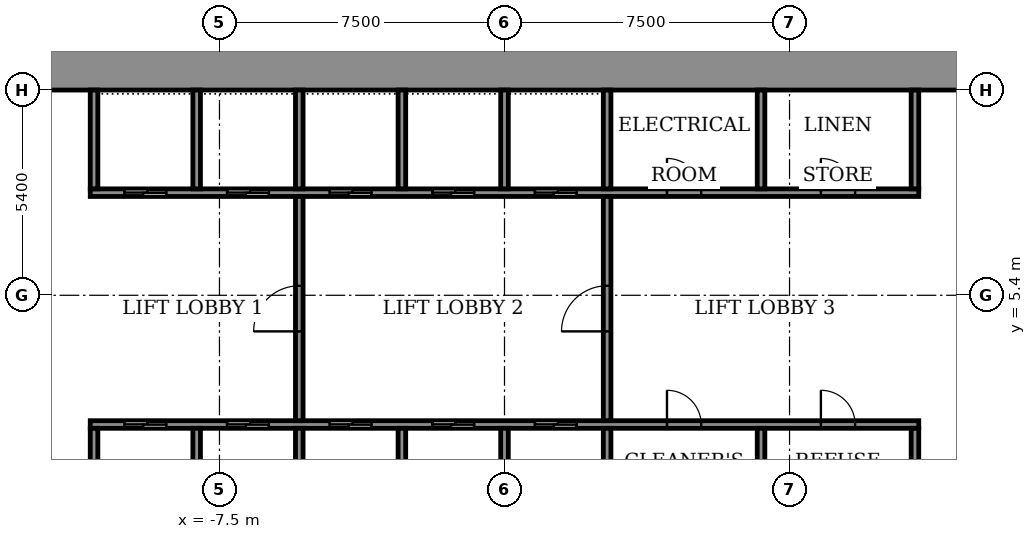
"""IFC4 building model, lengths in metres.
Left out: names, types, materials, properties, quantities, classifications, styles, units other than length and angle.
Written with IfcOpenShell. Run it as: python <this file> out.ifc"""

import sys

from ifc_helpers import new_model, si_unit, direction, frame, frame_2d, origin, place, context, subcontext, project, spatial, rectangle, extrude, element, fill, save


model = new_model("IFC4")
c1 = context("Model", 3, precision=1e-05, world=origin(), true_north=direction((0.0, 1.0)))
c2 = subcontext(c1, "Body", "Model", "MODEL_VIEW")
j1 = project(units=[si_unit("LENGTHUNIT", "METRE"), si_unit("PLANEANGLEUNIT", "RADIAN")], contexts=[c1])
p1 = place(None, origin())
s1 = spatial("IfcSite", under=j1, at=p1, CompositionType="ELEMENT")
p2 = place(p1, origin())
s2 = spatial("IfcBuilding", under=s1, at=p2, CompositionType="ELEMENT")
p3 = place(p2, frame((0.0, 0.0, 11.0)))
s3 = spatial("IfcBuildingStorey", under=s2, at=p3, CompositionType="ELEMENT", Elevation=11.0)
p4 = place(p3, frame((-15.0, 11.4, 0.0), z_axis=(0.0, 0.0, 1.0), x_axis=(1.0, 0.0, 0.0)))
e1 = element("IfcWall", 1, at=p4, inside=s3, PredefinedType="SHEAR", context=c2, shape_type="SweptSolid", body=[
    extrude(rectangle(XDim=30.0, YDim=1.2, at=frame_2d((15.0, 0.0))), origin(), (0.0, 0.0, 1.0), 5.0),
])
p5 = place(p3, frame((-10.9, 2.0, 0.0), z_axis=(0.0, 0.0, 1.0), x_axis=(1.0, 0.0, 0.0)))
e2 = element("IfcWall", 2, at=p5, inside=s3, PredefinedType="SHEAR", context=c2, shape_type="SweptSolid", body=[
    extrude(rectangle(XDim=21.8, YDim=0.2, at=frame_2d((10.9, 0.0))), origin(), (0.0, 0.0, 1.0), 4.45),
])
p6 = place(p5, frame((0.9, 0.0, 0.0)))
e3 = element("IfcOpeningElement", 3, at=p6, cuts=e2, PredefinedType="OPENING", context=c2, shape_type="SweptSolid", body=[
    extrude(rectangle(XDim=1.1, YDim=2.1, at=frame_2d((0.55, 1.05))), frame((0.0, 0.11, 0.0), z_axis=(0.0, -1.0, 0.0), x_axis=(1.0, 0.0, 0.0)), (0.0, 0.0, 1.0), 0.22),
])
p7 = place(p5, frame((3.6, 0.0, 0.0)))
e4 = element("IfcOpeningElement", 4, at=p7, cuts=e2, PredefinedType="OPENING", context=c2, shape_type="SweptSolid", body=[
    extrude(rectangle(XDim=1.1, YDim=2.1, at=frame_2d((0.55, 1.05))), frame((0.0, 0.11, 0.0), z_axis=(0.0, -1.0, 0.0), x_axis=(1.0, 0.0, 0.0)), (0.0, 0.0, 1.0), 0.22),
])
p8 = place(p5, frame((6.3, 0.0, 0.0)))
e5 = element("IfcOpeningElement", 5, at=p8, cuts=e2, PredefinedType="OPENING", context=c2, shape_type="SweptSolid", body=[
    extrude(rectangle(XDim=1.1, YDim=2.1, at=frame_2d((0.55, 1.05))), frame((0.0, 0.11, 0.0), z_axis=(0.0, -1.0, 0.0), x_axis=(1.0, 0.0, 0.0)), (0.0, 0.0, 1.0), 0.22),
])
p9 = place(p5, frame((9.0, 0.0, 0.0)))
e6 = element("IfcOpeningElement", 6, at=p9, cuts=e2, PredefinedType="OPENING", context=c2, shape_type="SweptSolid", body=[
    extrude(rectangle(XDim=1.1, YDim=2.1, at=frame_2d((0.55, 1.05))), frame((0.0, 0.11, 0.0), z_axis=(0.0, -1.0, 0.0), x_axis=(1.0, 0.0, 0.0)), (0.0, 0.0, 1.0), 0.22),
])
p10 = place(p5, frame((11.7, 0.0, 0.0)))
e7 = element("IfcOpeningElement", 7, at=p10, cuts=e2, PredefinedType="OPENING", context=c2, shape_type="SweptSolid", body=[
    extrude(rectangle(XDim=1.1, YDim=2.1, at=frame_2d((0.55, 1.05))), frame((0.0, 0.11, 0.0), z_axis=(0.0, -1.0, 0.0), x_axis=(1.0, 0.0, 0.0)), (0.0, 0.0, 1.0), 0.22),
])
p11 = place(p5, frame((15.175, 0.0, 0.0)))
e8 = element("IfcOpeningElement", 8, at=p11, cuts=e2, PredefinedType="OPENING", context=c2, shape_type="SweptSolid", body=[
    extrude(rectangle(XDim=0.9, YDim=2.1, at=frame_2d((0.45, 1.05))), frame((0.0, 0.11, 0.0), z_axis=(0.0, -1.0, 0.0), x_axis=(1.0, 0.0, 0.0)), (0.0, 0.0, 1.0), 0.22),
])
p12 = place(p5, frame((19.225, 0.0, 0.0)))
e9 = element("IfcOpeningElement", 9, at=p12, cuts=e2, PredefinedType="OPENING", context=c2, shape_type="SweptSolid", body=[
    extrude(rectangle(XDim=0.9, YDim=2.1, at=frame_2d((0.45, 1.05))), frame((0.0, 0.11, 0.0), z_axis=(0.0, -1.0, 0.0), x_axis=(1.0, 0.0, 0.0)), (0.0, 0.0, 1.0), 0.22),
])
p13 = place(p3, frame((-10.9, 8.1, 0.0), z_axis=(0.0, 0.0, 1.0), x_axis=(1.0, 0.0, 0.0)))
e10 = element("IfcWall", 10, at=p13, inside=s3, PredefinedType="SHEAR", context=c2, shape_type="SweptSolid", body=[
    extrude(rectangle(XDim=21.8, YDim=0.2, at=frame_2d((10.9, 0.0))), origin(), (0.0, 0.0, 1.0), 4.45),
])
p14 = place(p13, frame((0.9, 0.0, 0.0)))
e11 = element("IfcOpeningElement", 11, at=p14, cuts=e10, PredefinedType="OPENING", context=c2, shape_type="SweptSolid", body=[
    extrude(rectangle(XDim=1.1, YDim=2.1, at=frame_2d((0.55, 1.05))), frame((0.0, 0.11, 0.0), z_axis=(0.0, -1.0, 0.0), x_axis=(1.0, 0.0, 0.0)), (0.0, 0.0, 1.0), 0.22),
])
p15 = place(p13, frame((3.6, 0.0, 0.0)))
e12 = element("IfcOpeningElement", 12, at=p15, cuts=e10, PredefinedType="OPENING", context=c2, shape_type="SweptSolid", body=[
    extrude(rectangle(XDim=1.1, YDim=2.1, at=frame_2d((0.55, 1.05))), frame((0.0, 0.11, 0.0), z_axis=(0.0, -1.0, 0.0), x_axis=(1.0, 0.0, 0.0)), (0.0, 0.0, 1.0), 0.22),
])
p16 = place(p13, frame((6.3, 0.0, 0.0)))
e13 = element("IfcOpeningElement", 13, at=p16, cuts=e10, PredefinedType="OPENING", context=c2, shape_type="SweptSolid", body=[
    extrude(rectangle(XDim=1.1, YDim=2.1, at=frame_2d((0.55, 1.05))), frame((0.0, 0.11, 0.0), z_axis=(0.0, -1.0, 0.0), x_axis=(1.0, 0.0, 0.0)), (0.0, 0.0, 1.0), 0.22),
])
p17 = place(p13, frame((9.0, 0.0, 0.0)))
e14 = element("IfcOpeningElement", 14, at=p17, cuts=e10, PredefinedType="OPENING", context=c2, shape_type="SweptSolid", body=[
    extrude(rectangle(XDim=1.1, YDim=2.1, at=frame_2d((0.55, 1.05))), frame((0.0, 0.11, 0.0), z_axis=(0.0, -1.0, 0.0), x_axis=(1.0, 0.0, 0.0)), (0.0, 0.0, 1.0), 0.22),
])
p18 = place(p13, frame((11.7, 0.0, 0.0)))
e15 = element("IfcOpeningElement", 15, at=p18, cuts=e10, PredefinedType="OPENING", context=c2, shape_type="SweptSolid", body=[
    extrude(rectangle(XDim=1.1, YDim=2.1, at=frame_2d((0.55, 1.05))), frame((0.0, 0.11, 0.0), z_axis=(0.0, -1.0, 0.0), x_axis=(1.0, 0.0, 0.0)), (0.0, 0.0, 1.0), 0.22),
])
p19 = place(p13, frame((15.175, 0.0, 0.0)))
e16 = element("IfcOpeningElement", 16, at=p19, cuts=e10, PredefinedType="OPENING", context=c2, shape_type="SweptSolid", body=[
    extrude(rectangle(XDim=0.9, YDim=2.1, at=frame_2d((0.45, 1.05))), frame((0.0, 0.11, 0.0), z_axis=(0.0, -1.0, 0.0), x_axis=(1.0, 0.0, 0.0)), (0.0, 0.0, 1.0), 0.22),
])
p20 = place(p13, frame((19.225, 0.0, 0.0)))
e17 = element("IfcOpeningElement", 17, at=p20, cuts=e10, PredefinedType="OPENING", context=c2, shape_type="SweptSolid", body=[
    extrude(rectangle(XDim=0.9, YDim=2.1, at=frame_2d((0.45, 1.05))), frame((0.0, 0.11, 0.0), z_axis=(0.0, -1.0, 0.0), x_axis=(1.0, 0.0, 0.0)), (0.0, 0.0, 1.0), 0.22),
])
for number, where, z_axis, x_axis in (
    (18, (-10.8, -0.6, 0.0), (0.0, 0.0, 1.0), (0.0, 1.0, 0.0)),
    (19, (-8.1, -0.6, 0.0), (0.0, 0.0, 1.0), (0.0, 1.0, 0.0)),
    (20, (-5.4, -0.6, 0.0), (0.0, 0.0, 1.0), (0.0, 1.0, 0.0)),
    (21, (-2.7, -0.6, 0.0), (0.0, 0.0, 1.0), (0.0, 1.0, 0.0)),
    (22, (0.0, -0.6, 0.0), (0.0, 0.0, 1.0), (0.0, 1.0, 0.0)),
    (23, (2.7, -0.6, 0.0), (0.0, 0.0, 1.0), (0.0, 1.0, 0.0)),
):
    element("IfcWall", number, at=place(p3, frame(where, z_axis=z_axis, x_axis=x_axis)), inside=s3, PredefinedType="SHEAR", context=c2, shape_type="SweptSolid", body=[
        extrude(rectangle(XDim=2.5, YDim=0.2, at=frame_2d((1.25, 0.0))), origin(), (0.0, 0.0, 1.0), 4.45),
    ])
for number, where, z_axis, x_axis in (
    (24, (6.75, -0.6, 0.0), (0.0, 0.0, 1.0), (0.0, 1.0, 0.0)),
    (25, (10.8, -0.6, 0.0), (0.0, 0.0, 1.0), (0.0, 1.0, 0.0)),
):
    element("IfcWall", number, at=place(p3, frame(where, z_axis=z_axis, x_axis=x_axis)), inside=s3, PredefinedType="STANDARD", context=c2, shape_type="SweptSolid", body=[
        extrude(rectangle(XDim=2.5, YDim=0.2, at=frame_2d((1.25, 0.0))), origin(), (0.0, 0.0, 1.0), 4.45),
    ])
for number, where, z_axis, x_axis in (
    (26, (-10.8, 8.2, 0.0), (0.0, 0.0, 1.0), (0.0, 1.0, 0.0)),
    (27, (-8.1, 8.2, 0.0), (0.0, 0.0, 1.0), (0.0, 1.0, 0.0)),
    (28, (-5.4, 8.2, 0.0), (0.0, 0.0, 1.0), (0.0, 1.0, 0.0)),
    (29, (-2.7, 8.2, 0.0), (0.0, 0.0, 1.0), (0.0, 1.0, 0.0)),
    (30, (0.0, 8.2, 0.0), (0.0, 0.0, 1.0), (0.0, 1.0, 0.0)),
    (31, (2.7, 8.2, 0.0), (0.0, 0.0, 1.0), (0.0, 1.0, 0.0)),
):
    element("IfcWall", number, at=place(p3, frame(where, z_axis=z_axis, x_axis=x_axis)), inside=s3, PredefinedType="SHEAR", context=c2, shape_type="SweptSolid", body=[
        extrude(rectangle(XDim=2.6, YDim=0.2, at=frame_2d((1.3, 0.0))), origin(), (0.0, 0.0, 1.0), 4.45),
    ])
for number, where, z_axis, x_axis in (
    (32, (6.75, 8.2, 0.0), (0.0, 0.0, 1.0), (0.0, 1.0, 0.0)),
    (33, (10.8, 8.2, 0.0), (0.0, 0.0, 1.0), (0.0, 1.0, 0.0)),
):
    element("IfcWall", number, at=place(p3, frame(where, z_axis=z_axis, x_axis=x_axis)), inside=s3, PredefinedType="STANDARD", context=c2, shape_type="SweptSolid", body=[
        extrude(rectangle(XDim=2.6, YDim=0.2, at=frame_2d((1.3, 0.0))), origin(), (0.0, 0.0, 1.0), 4.45),
    ])
p21 = place(p3, frame((-5.4, 2.1, 0.0), z_axis=(0.0, 0.0, 1.0), x_axis=(0.0, 1.0, 0.0)))
e34 = element("IfcWall", 34, at=p21, inside=s3, PredefinedType="STANDARD", context=c2, shape_type="SweptSolid", body=[
    extrude(rectangle(XDim=5.9, YDim=0.2, at=frame_2d((2.95, 0.0))), origin(), (0.0, 0.0, 1.0), 4.45),
])
p22 = place(p21, frame((2.35, 0.0, 0.0)))
e35 = element("IfcOpeningElement", 35, at=p22, cuts=e34, PredefinedType="OPENING", context=c2, shape_type="SweptSolid", body=[
    extrude(rectangle(XDim=1.2, YDim=2.1, at=frame_2d((0.6, 1.05))), frame((0.0, 0.11, 0.0), z_axis=(0.0, -1.0, 0.0), x_axis=(1.0, 0.0, 0.0)), (0.0, 0.0, 1.0), 0.22),
])
p23 = place(p3, frame((2.7, 2.1, 0.0), z_axis=(0.0, 0.0, 1.0), x_axis=(0.0, 1.0, 0.0)))
e36 = element("IfcWall", 36, at=p23, inside=s3, PredefinedType="STANDARD", context=c2, shape_type="SweptSolid", body=[
    extrude(rectangle(XDim=5.9, YDim=0.2, at=frame_2d((2.95, 0.0))), origin(), (0.0, 0.0, 1.0), 4.45),
])
p24 = place(p23, frame((2.35, 0.0, 0.0)))
e37 = element("IfcOpeningElement", 37, at=p24, cuts=e36, PredefinedType="OPENING", context=c2, shape_type="SweptSolid", body=[
    extrude(rectangle(XDim=1.2, YDim=2.1, at=frame_2d((0.6, 1.05))), frame((0.0, 0.11, 0.0), z_axis=(0.0, -1.0, 0.0), x_axis=(1.0, 0.0, 0.0)), (0.0, 0.0, 1.0), 0.22),
])
p25 = place(p6, origin())
e38 = element("IfcDoor", 38, at=p25, inside=s3, OperationType="SLIDING_TO_LEFT", PredefinedType="DOOR", context=c2, shape_type="SweptSolid", body=[
    extrude(rectangle(XDim=1.1, YDim=2.1, at=frame_2d((0.55, 1.05))), frame((0.0, 0.025, 0.0), z_axis=(0.0, -1.0, 0.0), x_axis=(1.0, 0.0, 0.0)), (0.0, 0.0, 1.0), 0.05),
])
fill(e3, e38)
p26 = place(p7, origin())
e39 = element("IfcDoor", 39, at=p26, inside=s3, OperationType="SLIDING_TO_LEFT", PredefinedType="DOOR", context=c2, shape_type="SweptSolid", body=[
    extrude(rectangle(XDim=1.1, YDim=2.1, at=frame_2d((0.55, 1.05))), frame((0.0, 0.025, 0.0), z_axis=(0.0, -1.0, 0.0), x_axis=(1.0, 0.0, 0.0)), (0.0, 0.0, 1.0), 0.05),
])
fill(e4, e39)
p27 = place(p8, origin())
e40 = element("IfcDoor", 40, at=p27, inside=s3, OperationType="SLIDING_TO_LEFT", PredefinedType="DOOR", context=c2, shape_type="SweptSolid", body=[
    extrude(rectangle(XDim=1.1, YDim=2.1, at=frame_2d((0.55, 1.05))), frame((0.0, 0.025, 0.0), z_axis=(0.0, -1.0, 0.0), x_axis=(1.0, 0.0, 0.0)), (0.0, 0.0, 1.0), 0.05),
])
fill(e5, e40)
p28 = place(p9, origin())
e41 = element("IfcDoor", 41, at=p28, inside=s3, OperationType="SLIDING_TO_LEFT", PredefinedType="DOOR", context=c2, shape_type="SweptSolid", body=[
    extrude(rectangle(XDim=1.1, YDim=2.1, at=frame_2d((0.55, 1.05))), frame((0.0, 0.025, 0.0), z_axis=(0.0, -1.0, 0.0), x_axis=(1.0, 0.0, 0.0)), (0.0, 0.0, 1.0), 0.05),
])
fill(e6, e41)
p29 = place(p10, origin())
e42 = element("IfcDoor", 42, at=p29, inside=s3, OperationType="SLIDING_TO_LEFT", PredefinedType="DOOR", context=c2, shape_type="SweptSolid", body=[
    extrude(rectangle(XDim=1.1, YDim=2.1, at=frame_2d((0.55, 1.05))), frame((0.0, 0.025, 0.0), z_axis=(0.0, -1.0, 0.0), x_axis=(1.0, 0.0, 0.0)), (0.0, 0.0, 1.0), 0.05),
])
fill(e7, e42)
p30 = place(p14, origin())
e43 = element("IfcDoor", 43, at=p30, inside=s3, OperationType="SLIDING_TO_LEFT", PredefinedType="DOOR", context=c2, shape_type="SweptSolid", body=[
    extrude(rectangle(XDim=1.1, YDim=2.1, at=frame_2d((0.55, 1.05))), frame((0.0, 0.025, 0.0), z_axis=(0.0, -1.0, 0.0), x_axis=(1.0, 0.0, 0.0)), (0.0, 0.0, 1.0), 0.05),
])
fill(e11, e43)
p31 = place(p15, origin())
e44 = element("IfcDoor", 44, at=p31, inside=s3, OperationType="SLIDING_TO_LEFT", PredefinedType="DOOR", context=c2, shape_type="SweptSolid", body=[
    extrude(rectangle(XDim=1.1, YDim=2.1, at=frame_2d((0.55, 1.05))), frame((0.0, 0.025, 0.0), z_axis=(0.0, -1.0, 0.0), x_axis=(1.0, 0.0, 0.0)), (0.0, 0.0, 1.0), 0.05),
])
fill(e12, e44)
p32 = place(p16, origin())
e45 = element("IfcDoor", 45, at=p32, inside=s3, OperationType="SLIDING_TO_LEFT", PredefinedType="DOOR", context=c2, shape_type="SweptSolid", body=[
    extrude(rectangle(XDim=1.1, YDim=2.1, at=frame_2d((0.55, 1.05))), frame((0.0, 0.025, 0.0), z_axis=(0.0, -1.0, 0.0), x_axis=(1.0, 0.0, 0.0)), (0.0, 0.0, 1.0), 0.05),
])
fill(e13, e45)
p33 = place(p17, origin())
e46 = element("IfcDoor", 46, at=p33, inside=s3, OperationType="SLIDING_TO_LEFT", PredefinedType="DOOR", context=c2, shape_type="SweptSolid", body=[
    extrude(rectangle(XDim=1.1, YDim=2.1, at=frame_2d((0.55, 1.05))), frame((0.0, 0.025, 0.0), z_axis=(0.0, -1.0, 0.0), x_axis=(1.0, 0.0, 0.0)), (0.0, 0.0, 1.0), 0.05),
])
fill(e14, e46)
p34 = place(p18, origin())
e47 = element("IfcDoor", 47, at=p34, inside=s3, OperationType="SLIDING_TO_LEFT", PredefinedType="DOOR", context=c2, shape_type="SweptSolid", body=[
    extrude(rectangle(XDim=1.1, YDim=2.1, at=frame_2d((0.55, 1.05))), frame((0.0, 0.025, 0.0), z_axis=(0.0, -1.0, 0.0), x_axis=(1.0, 0.0, 0.0)), (0.0, 0.0, 1.0), 0.05),
])
fill(e15, e47)
p35 = place(p11, origin())
e48 = element("IfcDoor", 48, at=p35, inside=s3, OperationType="SINGLE_SWING_RIGHT", PredefinedType="DOOR", context=c2, shape_type="SweptSolid", body=[
    extrude(rectangle(XDim=0.9, YDim=2.1, at=frame_2d((0.45, 1.05))), frame((0.0, 0.025, 0.0), z_axis=(0.0, -1.0, 0.0), x_axis=(1.0, 0.0, 0.0)), (0.0, 0.0, 1.0), 0.05),
])
fill(e8, e48)
p36 = place(p12, origin())
e49 = element("IfcDoor", 49, at=p36, inside=s3, OperationType="SINGLE_SWING_RIGHT", PredefinedType="DOOR", context=c2, shape_type="SweptSolid", body=[
    extrude(rectangle(XDim=0.9, YDim=2.1, at=frame_2d((0.45, 1.05))), frame((0.0, 0.025, 0.0), z_axis=(0.0, -1.0, 0.0), x_axis=(1.0, 0.0, 0.0)), (0.0, 0.0, 1.0), 0.05),
])
fill(e9, e49)
p37 = place(p19, origin())
e50 = element("IfcDoor", 50, at=p37, inside=s3, OperationType="SINGLE_SWING_LEFT", PredefinedType="DOOR", context=c2, shape_type="SweptSolid", body=[
    extrude(rectangle(XDim=0.9, YDim=2.1, at=frame_2d((0.45, 1.05))), frame((0.0, 0.025, 0.0), z_axis=(0.0, -1.0, 0.0), x_axis=(1.0, 0.0, 0.0)), (0.0, 0.0, 1.0), 0.05),
])
fill(e16, e50)
p38 = place(p20, origin())
e51 = element("IfcDoor", 51, at=p38, inside=s3, OperationType="SINGLE_SWING_RIGHT", PredefinedType="DOOR", context=c2, shape_type="SweptSolid", body=[
    extrude(rectangle(XDim=0.9, YDim=2.1, at=frame_2d((0.45, 1.05))), frame((0.0, 0.025, 0.0), z_axis=(0.0, -1.0, 0.0), x_axis=(1.0, 0.0, 0.0)), (0.0, 0.0, 1.0), 0.05),
])
fill(e17, e51)
p39 = place(p22, origin())
e52 = element("IfcDoor", 52, at=p39, inside=s3, OperationType="SINGLE_SWING_LEFT", PredefinedType="DOOR", context=c2, shape_type="SweptSolid", body=[
    extrude(rectangle(XDim=1.2, YDim=2.1, at=frame_2d((0.6, 1.05))), frame((0.0, 0.025, 0.0), z_axis=(0.0, -1.0, 0.0), x_axis=(1.0, 0.0, 0.0)), (0.0, 0.0, 1.0), 0.05),
])
fill(e35, e52)
p40 = place(p24, origin())
e53 = element("IfcDoor", 53, at=p40, inside=s3, OperationType="SINGLE_SWING_LEFT", PredefinedType="DOOR", context=c2, shape_type="SweptSolid", body=[
    extrude(rectangle(XDim=1.2, YDim=2.1, at=frame_2d((0.6, 1.05))), frame((0.0, 0.025, 0.0), z_axis=(0.0, -1.0, 0.0), x_axis=(1.0, 0.0, 0.0)), (0.0, 0.0, 1.0), 0.05),
])
fill(e37, e53)
save(model, sys.argv[1])
